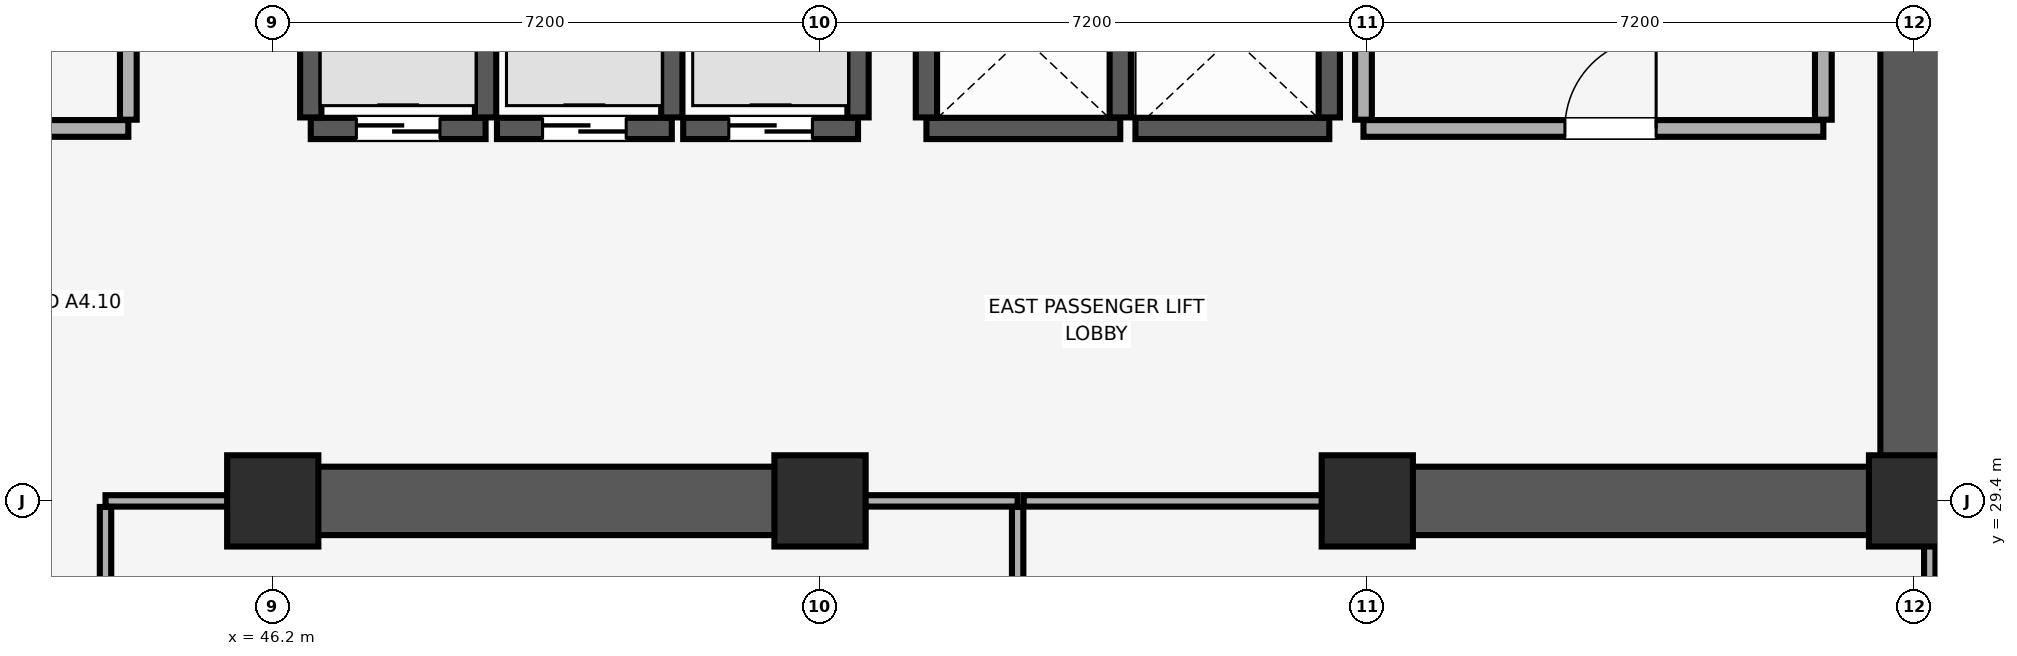
"""IFC4 building model, lengths in metres.
Left out: names, types, materials, properties, quantities, classifications, styles, units other than length and angle.
Written with IfcOpenShell. Run it as: python <this file> out.ifc"""

import sys

from ifc_helpers import new_model, si_unit, direction, frame, frame_2d, origin, origin_2d, place, context, subcontext, project, spatial, rectangle, extrude, element, fill, save


model = new_model("IFC4")
c1 = context("Model", 3, precision=1e-05, world=origin(), true_north=direction((0.0, 1.0)))
c2 = subcontext(c1, "Body", "Model", "MODEL_VIEW")
j1 = project(units=[si_unit("LENGTHUNIT", "METRE"), si_unit("PLANEANGLEUNIT", "RADIAN")], contexts=[c1])
p1 = place(None, origin())
s1 = spatial("IfcSite", under=j1, at=p1, CompositionType="ELEMENT")
p2 = place(p1, origin())
s2 = spatial("IfcBuilding", under=s1, at=p2, CompositionType="ELEMENT")
p3 = place(p2, frame((0.0, 0.0, 220.55)))
s3 = spatial("IfcBuildingStorey", under=s2, at=p3, CompositionType="ELEMENT", Elevation=220.55)
for number, where, z_axis, x_axis in (
    (1, (46.2, 29.4, 0.0), (0.0, 0.0, 1.0), (1.0, 0.0, 0.0)),
    (2, (53.4, 29.4, 0.0), (0.0, 0.0, 1.0), (1.0, 0.0, 0.0)),
    (3, (60.6, 29.4, 0.0), (0.0, 0.0, 1.0), (1.0, 0.0, 0.0)),
    (4, (67.8, 29.4, 0.0), (0.0, 0.0, 1.0), (1.0, 0.0, 0.0)),
):
    element("IfcColumn", number, at=place(p3, frame(where, z_axis=z_axis, x_axis=x_axis)), inside=s3, PredefinedType="COLUMN", context=c2, shape_type="SweptSolid", body=[
        extrude(rectangle(XDim=1.2, YDim=1.2, at=origin_2d()), origin(), (0.0, 0.0, 1.0), 3.56),
    ])
p4 = place(p3, frame((67.8, 29.4, 0.0), z_axis=(0.0, 0.0, 1.0), x_axis=(0.0, 1.0, 0.0)))
e5 = element("IfcWall", 5, at=p4, inside=s3, PredefinedType="SHEAR", context=c2, shape_type="SweptSolid", body=[
    extrude(rectangle(XDim=19.2, YDim=0.9, at=frame_2d((9.6, 0.0))), origin(), (0.0, 0.0, 1.0), 3.56),
])
p5 = place(p3, frame((46.0, 29.4, 0.0), z_axis=(0.0, 0.0, 1.0), x_axis=(1.0, 0.0, 0.0)))
e6 = element("IfcWall", 6, at=p5, inside=s3, PredefinedType="SHEAR", context=c2, shape_type="SweptSolid", body=[
    extrude(rectangle(XDim=7.6, YDim=0.9, at=frame_2d((3.8, 0.0))), origin(), (0.0, 0.0, 1.0), 3.56),
])
p6 = place(p3, frame((60.4, 29.4, 0.0), z_axis=(0.0, 0.0, 1.0), x_axis=(1.0, 0.0, 0.0)))
e7 = element("IfcWall", 7, at=p6, inside=s3, PredefinedType="SHEAR", context=c2, shape_type="SweptSolid", body=[
    extrude(rectangle(XDim=6.945, YDim=0.9, at=frame_2d((3.473, 0.0))), origin(), (0.0, 0.0, 1.0), 3.56),
])
p7 = place(p3, frame((46.7, 34.3, 0.0), z_axis=(0.0, 0.0, 1.0), x_axis=(1.0, 0.0, 0.0)))
e8 = element("IfcWall", 8, at=p7, inside=s3, PredefinedType="SHEAR", context=c2, shape_type="SweptSolid", body=[
    extrude(rectangle(XDim=2.3, YDim=0.28, at=frame_2d((1.15, 0.0))), origin(), (0.0, 0.0, 1.0), 3.56),
])
p8 = place(p7, frame((0.6, 0.0, 0.0)))
e9 = element("IfcOpeningElement", 9, at=p8, cuts=e8, PredefinedType="OPENING", context=c2, shape_type="SweptSolid", body=[
    extrude(rectangle(XDim=1.1, YDim=2.2, at=frame_2d((0.55, 1.1))), frame((0.0, 0.15, 0.0), z_axis=(0.0, -1.0, 0.0), x_axis=(1.0, 0.0, 0.0)), (0.0, 0.0, 1.0), 0.3),
])
for number, where, z_axis, x_axis in (
    (10, (46.7, 34.445, 0.0), (0.0, 0.0, 1.0), (0.0, 1.0, 0.0)),
    (11, (49.0, 34.445, 0.0), (0.0, 0.0, 1.0), (0.0, 1.0, 0.0)),
):
    element("IfcWall", number, at=place(p3, frame(where, z_axis=z_axis, x_axis=x_axis)), inside=s3, PredefinedType="SHEAR", context=c2, shape_type="SweptSolid", body=[
        extrude(rectangle(XDim=2.01, YDim=0.28, at=frame_2d((1.005, 0.0))), origin(), (0.0, 0.0, 1.0), 3.56),
    ])
p9 = place(p3, frame((49.15, 34.3, 0.0), z_axis=(0.0, 0.0, 1.0), x_axis=(1.0, 0.0, 0.0)))
e12 = element("IfcWall", 12, at=p9, inside=s3, PredefinedType="SHEAR", context=c2, shape_type="SweptSolid", body=[
    extrude(rectangle(XDim=2.3, YDim=0.28, at=frame_2d((1.15, 0.0))), origin(), (0.0, 0.0, 1.0), 3.56),
])
p10 = place(p9, frame((0.6, 0.0, 0.0)))
e13 = element("IfcOpeningElement", 13, at=p10, cuts=e12, PredefinedType="OPENING", context=c2, shape_type="SweptSolid", body=[
    extrude(rectangle(XDim=1.1, YDim=2.2, at=frame_2d((0.55, 1.1))), frame((0.0, 0.15, 0.0), z_axis=(0.0, -1.0, 0.0), x_axis=(1.0, 0.0, 0.0)), (0.0, 0.0, 1.0), 0.3),
])
p11 = place(p3, frame((51.45, 34.445, 0.0), z_axis=(0.0, 0.0, 1.0), x_axis=(0.0, 1.0, 0.0)))
e14 = element("IfcWall", 14, at=p11, inside=s3, PredefinedType="SHEAR", context=c2, shape_type="SweptSolid", body=[
    extrude(rectangle(XDim=2.01, YDim=0.28, at=frame_2d((1.005, 0.0))), origin(), (0.0, 0.0, 1.0), 3.56),
])
p12 = place(p3, frame((51.6, 34.3, 0.0), z_axis=(0.0, 0.0, 1.0), x_axis=(1.0, 0.0, 0.0)))
e15 = element("IfcWall", 15, at=p12, inside=s3, PredefinedType="SHEAR", context=c2, shape_type="SweptSolid", body=[
    extrude(rectangle(XDim=2.3, YDim=0.28, at=frame_2d((1.15, 0.0))), origin(), (0.0, 0.0, 1.0), 3.56),
])
p13 = place(p12, frame((0.6, 0.0, 0.0)))
e16 = element("IfcOpeningElement", 16, at=p13, cuts=e15, PredefinedType="OPENING", context=c2, shape_type="SweptSolid", body=[
    extrude(rectangle(XDim=1.1, YDim=2.2, at=frame_2d((0.55, 1.1))), frame((0.0, 0.15, 0.0), z_axis=(0.0, -1.0, 0.0), x_axis=(1.0, 0.0, 0.0)), (0.0, 0.0, 1.0), 0.3),
])
p14 = place(p3, frame((53.9, 34.445, 0.0), z_axis=(0.0, 0.0, 1.0), x_axis=(0.0, 1.0, 0.0)))
e17 = element("IfcWall", 17, at=p14, inside=s3, PredefinedType="SHEAR", context=c2, shape_type="SweptSolid", body=[
    extrude(rectangle(XDim=2.01, YDim=0.28, at=frame_2d((1.005, 0.0))), origin(), (0.0, 0.0, 1.0), 3.56),
])
p15 = place(p3, frame((54.8, 34.3, 0.0), z_axis=(0.0, 0.0, 1.0), x_axis=(1.0, 0.0, 0.0)))
e18 = element("IfcWall", 18, at=p15, inside=s3, PredefinedType="SHEAR", context=c2, shape_type="SweptSolid", body=[
    extrude(rectangle(XDim=2.55, YDim=0.28, at=frame_2d((1.275, 0.0))), origin(), (0.0, 0.0, 1.0), 3.56),
])
for number, where, z_axis, x_axis in (
    (19, (54.8, 34.445, 0.0), (0.0, 0.0, 1.0), (0.0, 1.0, 0.0)),
    (20, (57.35, 34.445, 0.0), (0.0, 0.0, 1.0), (0.0, 1.0, 0.0)),
):
    element("IfcWall", number, at=place(p3, frame(where, z_axis=z_axis, x_axis=x_axis)), inside=s3, PredefinedType="SHEAR", context=c2, shape_type="SweptSolid", body=[
        extrude(rectangle(XDim=2.11, YDim=0.28, at=frame_2d((1.055, 0.0))), origin(), (0.0, 0.0, 1.0), 3.56),
    ])
p16 = place(p3, frame((57.55, 34.3, 0.0), z_axis=(0.0, 0.0, 1.0), x_axis=(1.0, 0.0, 0.0)))
e21 = element("IfcWall", 21, at=p16, inside=s3, PredefinedType="SHEAR", context=c2, shape_type="SweptSolid", body=[
    extrude(rectangle(XDim=2.55, YDim=0.28, at=frame_2d((1.275, 0.0))), origin(), (0.0, 0.0, 1.0), 3.56),
])
p17 = place(p3, frame((60.1, 34.445, 0.0), z_axis=(0.0, 0.0, 1.0), x_axis=(0.0, 1.0, 0.0)))
e22 = element("IfcWall", 22, at=p17, inside=s3, PredefinedType="SHEAR", context=c2, shape_type="SweptSolid", body=[
    extrude(rectangle(XDim=2.11, YDim=0.28, at=frame_2d((1.055, 0.0))), origin(), (0.0, 0.0, 1.0), 3.56),
])
p18 = place(p3, frame((60.55, 34.3, 0.0), z_axis=(0.0, 0.0, 1.0), x_axis=(1.0, 0.0, 0.0)))
e23 = element("IfcWall", 23, at=p18, inside=s3, PredefinedType="PARTITIONING", context=c2, shape_type="SweptSolid", body=[
    extrude(rectangle(XDim=6.05, YDim=0.22, at=frame_2d((3.025, 0.0))), origin(), (0.0, 0.0, 1.0), 3.56),
])
p19 = place(p18, frame((2.65, 0.0, 0.0)))
e24 = element("IfcOpeningElement", 24, at=p19, cuts=e23, PredefinedType="OPENING", context=c2, shape_type="SweptSolid", body=[
    extrude(rectangle(XDim=1.2, YDim=2.15, at=frame_2d((0.6, 1.075))), frame((0.0, 0.12, 0.0), z_axis=(0.0, -1.0, 0.0), x_axis=(1.0, 0.0, 0.0)), (0.0, 0.0, 1.0), 0.24),
])
p20 = place(p3, frame((60.55, 34.415, 0.0), z_axis=(0.0, 0.0, 1.0), x_axis=(0.0, 1.0, 0.0)))
e25 = element("IfcWall", 25, at=p20, inside=s3, PredefinedType="PARTITIONING", context=c2, shape_type="SweptSolid", body=[
    extrude(rectangle(XDim=5.64, YDim=0.22, at=frame_2d((2.82, 0.0))), origin(), (0.0, 0.0, 1.0), 3.56),
])
p21 = place(p3, frame((66.6, 34.415, 0.0), z_axis=(0.0, 0.0, 1.0), x_axis=(0.0, 1.0, 0.0)))
e26 = element("IfcWall", 26, at=p21, inside=s3, PredefinedType="PARTITIONING", context=c2, shape_type="SweptSolid", body=[
    extrude(rectangle(XDim=5.43, YDim=0.22, at=frame_2d((2.715, 0.0))), origin(), (0.0, 0.0, 1.0), 3.56),
])
p22 = place(p3, frame((39.7, 34.3, 0.0), z_axis=(0.0, 0.0, 1.0), x_axis=(1.0, 0.0, 0.0)))
e27 = element("IfcWall", 27, at=p22, inside=s3, PredefinedType="PARTITIONING", context=c2, shape_type="SweptSolid", body=[
    extrude(rectangle(XDim=4.6, YDim=0.22, at=frame_2d((2.3, 0.0))), origin(), (0.0, 0.0, 1.0), 3.56),
])
p23 = place(p22, frame((1.7, 0.0, 0.0)))
e28 = element("IfcOpeningElement", 28, at=p23, cuts=e27, PredefinedType="OPENING", context=c2, shape_type="SweptSolid", body=[
    extrude(rectangle(XDim=1.2, YDim=2.15, at=frame_2d((0.6, 1.075))), frame((0.0, 0.12, 0.0), z_axis=(0.0, -1.0, 0.0), x_axis=(1.0, 0.0, 0.0)), (0.0, 0.0, 1.0), 0.24),
])
p24 = place(p3, frame((44.3, 34.415, 0.0), z_axis=(0.0, 0.0, 1.0), x_axis=(0.0, 1.0, 0.0)))
e29 = element("IfcWall", 29, at=p24, inside=s3, PredefinedType="PARTITIONING", context=c2, shape_type="SweptSolid", body=[
    extrude(rectangle(XDim=5.785, YDim=0.22, at=frame_2d((2.893, 0.0))), origin(), (0.0, 0.0, 1.0), 3.56),
])
p25 = place(p3, frame((44.0, 29.4, 0.0), z_axis=(0.0, 0.0, 1.0), x_axis=(1.0, 0.0, 0.0)))
e30 = element("IfcWall", 30, at=p25, inside=s3, PredefinedType="PARTITIONING", context=c2, shape_type="SweptSolid", body=[
    extrude(rectangle(XDim=1.99, YDim=0.15, at=frame_2d((0.995, 0.0))), origin(), (0.0, 0.0, 1.0), 2.46),
])
p26 = place(p3, frame((53.61, 29.4, 0.0), z_axis=(0.0, 0.0, 1.0), x_axis=(1.0, 0.0, 0.0)))
e31 = element("IfcWall", 31, at=p26, inside=s3, PredefinedType="PARTITIONING", context=c2, shape_type="SweptSolid", body=[
    extrude(rectangle(XDim=2.39, YDim=0.15, at=frame_2d((1.195, 0.0))), origin(), (0.0, 0.0, 1.0), 2.46),
])
for number, where, z_axis, x_axis in (
    (32, (44.0, 26.78, 0.0), (0.0, 0.0, 1.0), (0.0, 1.0, 0.0)),
    (33, (56.0, 26.78, 0.0), (0.0, 0.0, 1.0), (0.0, 1.0, 0.0)),
):
    element("IfcWall", number, at=place(p3, frame(where, z_axis=z_axis, x_axis=x_axis)), inside=s3, PredefinedType="PARTITIONING", context=c2, shape_type="SweptSolid", body=[
        extrude(rectangle(XDim=2.54, YDim=0.15, at=frame_2d((1.27, 0.0))), origin(), (0.0, 0.0, 1.0), 3.56),
    ])
p27 = place(p3, frame((56.08, 29.4, 0.0), z_axis=(0.0, 0.0, 1.0), x_axis=(1.0, 0.0, 0.0)))
e34 = element("IfcWall", 34, at=p27, inside=s3, PredefinedType="PARTITIONING", context=c2, shape_type="SweptSolid", body=[
    extrude(rectangle(XDim=4.31, YDim=0.15, at=frame_2d((2.155, 0.0))), origin(), (0.0, 0.0, 1.0), 2.46),
])
p28 = place(p3, frame((68.0, 26.78, 0.0), z_axis=(0.0, 0.0, 1.0), x_axis=(0.0, 1.0, 0.0)))
e35 = element("IfcWall", 35, at=p28, inside=s3, PredefinedType="PARTITIONING", context=c2, shape_type="SweptSolid", body=[
    extrude(rectangle(XDim=2.61, YDim=0.15, at=frame_2d((1.305, 0.0))), origin(), (0.0, 0.0, 1.0), 3.06),
])
p29 = place(p8, origin())
e36 = element("IfcDoor", 36, at=p29, inside=s3, OperationType="DOUBLE_DOOR_SLIDING", PredefinedType="DOOR", context=c2, shape_type="SweptSolid", body=[
    extrude(rectangle(XDim=1.1, YDim=2.2, at=frame_2d((0.55, 1.1))), frame((0.0, 0.025, 0.0), z_axis=(0.0, -1.0, 0.0), x_axis=(1.0, 0.0, 0.0)), (0.0, 0.0, 1.0), 0.05),
])
fill(e9, e36)
p30 = place(p10, origin())
e37 = element("IfcDoor", 37, at=p30, inside=s3, OperationType="DOUBLE_DOOR_SLIDING", PredefinedType="DOOR", context=c2, shape_type="SweptSolid", body=[
    extrude(rectangle(XDim=1.1, YDim=2.2, at=frame_2d((0.55, 1.1))), frame((0.0, 0.025, 0.0), z_axis=(0.0, -1.0, 0.0), x_axis=(1.0, 0.0, 0.0)), (0.0, 0.0, 1.0), 0.05),
])
fill(e13, e37)
p31 = place(p13, origin())
e38 = element("IfcDoor", 38, at=p31, inside=s3, OperationType="DOUBLE_DOOR_SLIDING", PredefinedType="DOOR", context=c2, shape_type="SweptSolid", body=[
    extrude(rectangle(XDim=1.1, YDim=2.2, at=frame_2d((0.55, 1.1))), frame((0.0, 0.025, 0.0), z_axis=(0.0, -1.0, 0.0), x_axis=(1.0, 0.0, 0.0)), (0.0, 0.0, 1.0), 0.05),
])
fill(e16, e38)
p32 = place(p19, origin())
e39 = element("IfcDoor", 39, at=p32, inside=s3, OperationType="SINGLE_SWING_RIGHT", PredefinedType="DOOR", context=c2, shape_type="SweptSolid", body=[
    extrude(rectangle(XDim=1.2, YDim=2.15, at=frame_2d((0.6, 1.075))), frame((0.0, 0.025, 0.0), z_axis=(0.0, -1.0, 0.0), x_axis=(1.0, 0.0, 0.0)), (0.0, 0.0, 1.0), 0.05),
])
fill(e24, e39)
save(model, sys.argv[1])
